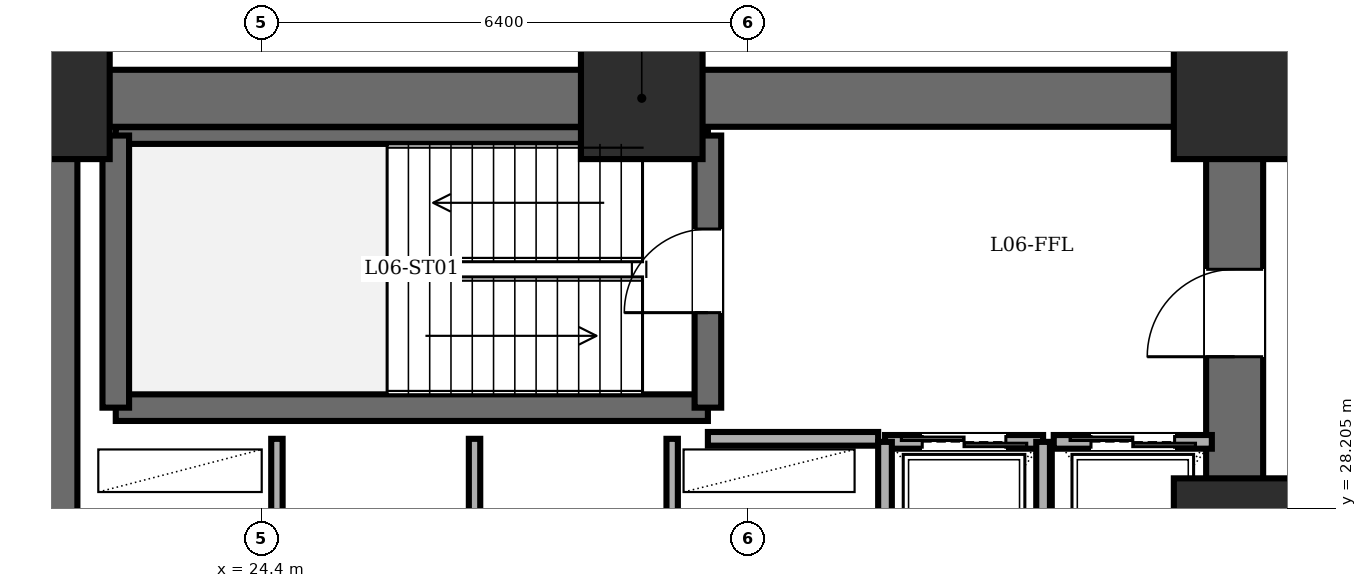
"""IFC4 building model, lengths in metres.
Left out: names, types, materials, properties, quantities, classifications, styles, units other than length and angle.
Written with IfcOpenShell. Run it as: python <this file> out.ifc"""

import sys

from ifc_helpers import new_model, si_unit, direction, frame, frame_2d, origin, origin_2d, place, context, subcontext, project, spatial, rectangle, extrude, element, fill, save


model = new_model("IFC4")
c1 = context("Model", 3, precision=1e-05, world=origin(), true_north=direction((0.0, 1.0)))
c2 = subcontext(c1, "Body", "Model", "MODEL_VIEW")
j1 = project(units=[si_unit("LENGTHUNIT", "METRE"), si_unit("PLANEANGLEUNIT", "RADIAN")], contexts=[c1])
p1 = place(None, origin())
s1 = spatial("IfcSite", under=j1, at=p1, CompositionType="ELEMENT")
p2 = place(p1, origin())
s2 = spatial("IfcBuilding", under=s1, at=p2, CompositionType="ELEMENT")
p3 = place(p2, frame((0.0, 0.0, 24.0)))
s3 = spatial("IfcBuildingStorey", under=s2, at=p3, CompositionType="ELEMENT", Elevation=24.0)
for number, where, z_axis, x_axis in (
    (1, (37.2, 27.8, 0.0), (0.0, 0.0, 1.0), (1.0, 0.0, 0.0)),
    (2, (37.2, 33.6, 0.0), (0.0, 0.0, 1.0), (1.0, 0.0, 0.0)),
    (3, (29.4, 33.6, 0.0), (0.0, 0.0, 1.0), (1.0, 0.0, 0.0)),
    (4, (21.6, 33.6, 0.0), (0.0, 0.0, 1.0), (1.0, 0.0, 0.0)),
):
    element("IfcColumn", number, at=place(p3, frame(where, z_axis=z_axis, x_axis=x_axis)), inside=s3, PredefinedType="COLUMN", context=c2, shape_type="SweptSolid", body=[
        extrude(rectangle(XDim=1.6, YDim=1.6, at=origin_2d()), origin(), (0.0, 0.0, 1.0), 4.8),
    ])
p4 = place(p3, frame((21.6, 14.4, 0.0), z_axis=(0.0, 0.0, 1.0), x_axis=(0.0, 1.0, 0.0)))
e5 = element("IfcWall", 5, at=p4, inside=s3, PredefinedType="SHEAR", context=c2, shape_type="SweptSolid", body=[
    extrude(rectangle(XDim=19.2, YDim=0.75, at=frame_2d((9.6, 0.0))), origin(), (0.0, 0.0, 1.0), 4.6),
])
p5 = place(p3, frame((21.6, 33.6, 0.0), z_axis=(0.0, 0.0, 1.0), x_axis=(1.0, 0.0, 0.0)))
e6 = element("IfcWall", 6, at=p5, inside=s3, PredefinedType="SHEAR", context=c2, shape_type="SweptSolid", body=[
    extrude(rectangle(XDim=15.6, YDim=0.75, at=frame_2d((7.8, 0.0))), origin(), (0.0, 0.0, 1.0), 4.6),
])
p6 = place(p3, frame((37.2, 14.4, 0.0), z_axis=(0.0, 0.0, 1.0), x_axis=(0.0, 1.0, 0.0)))
e7 = element("IfcWall", 7, at=p6, inside=s3, PredefinedType="SHEAR", context=c2, shape_type="SweptSolid", body=[
    extrude(rectangle(XDim=19.2, YDim=0.75, at=frame_2d((9.6, 0.0))), origin(), (0.0, 0.0, 1.0), 4.6),
])
p7 = place(p6, frame((15.8, 0.0, 0.0)))
e8 = element("IfcOpeningElement", 8, at=p7, cuts=e7, PredefinedType="OPENING", context=c2, shape_type="SweptSolid", body=[
    extrude(rectangle(XDim=1.15, YDim=2.15, at=frame_2d((0.575, 1.075))), frame((0.0, 0.385, 0.0), z_axis=(0.0, -1.0, 0.0), x_axis=(1.0, 0.0, 0.0)), (0.0, 0.0, 1.0), 0.77),
])
p8 = place(p6, frame((3.6, 0.0, 0.0)))
e9 = element("IfcOpeningElement", 9, at=p8, cuts=e7, PredefinedType="OPENING", context=c2, shape_type="SweptSolid", body=[
    extrude(rectangle(XDim=1.1, YDim=2.15, at=frame_2d((0.55, 1.075))), frame((0.0, 0.385, 0.0), z_axis=(0.0, -1.0, 0.0), x_axis=(1.0, 0.0, 0.0)), (0.0, 0.0, 1.0), 0.77),
])
p9 = place(p6, frame((8.6, 0.0, 0.0)))
e10 = element("IfcOpeningElement", 10, at=p9, cuts=e7, PredefinedType="OPENING", context=c2, shape_type="SweptSolid", body=[
    extrude(rectangle(XDim=1.3, YDim=2.2, at=frame_2d((0.65, 1.1))), frame((0.0, 0.385, 0.0), z_axis=(0.0, -1.0, 0.0), x_axis=(1.0, 0.0, 0.0)), (0.0, 0.0, 1.0), 0.77),
])
p10 = place(p3, frame((22.48, 29.53, 0.0), z_axis=(0.0, 0.0, 1.0), x_axis=(1.0, 0.0, 0.0)))
e11 = element("IfcWall", 11, at=p10, inside=s3, PredefinedType="SOLIDWALL", context=c2, shape_type="SweptSolid", body=[
    extrude(rectangle(XDim=7.79, YDim=0.35, at=frame_2d((3.895, 0.0))), origin(), (0.0, 0.0, 1.0), 4.6),
])
p11 = place(p3, frame((22.48, 33.11, 0.0), z_axis=(0.0, 0.0, 1.0), x_axis=(1.0, 0.0, 0.0)))
e12 = element("IfcWall", 12, at=p11, inside=s3, PredefinedType="PARTITIONING", context=c2, shape_type="SweptSolid", body=[
    extrude(rectangle(XDim=7.79, YDim=0.22, at=frame_2d((3.895, 0.0))), origin(), (0.0, 0.0, 1.0), 4.6),
])
p12 = place(p3, frame((22.48, 29.53, 0.0), z_axis=(0.0, 0.0, 1.0), x_axis=(0.0, 1.0, 0.0)))
e13 = element("IfcWall", 13, at=p12, inside=s3, PredefinedType="SOLIDWALL", context=c2, shape_type="SweptSolid", body=[
    extrude(rectangle(XDim=3.58, YDim=0.35, at=frame_2d((1.79, 0.0))), origin(), (0.0, 0.0, 1.0), 4.6),
])
p13 = place(p3, frame((30.27, 29.53, 0.0), z_axis=(0.0, 0.0, 1.0), x_axis=(0.0, 1.0, 0.0)))
e14 = element("IfcWall", 14, at=p13, inside=s3, PredefinedType="SOLIDWALL", context=c2, shape_type="SweptSolid", body=[
    extrude(rectangle(XDim=3.58, YDim=0.35, at=frame_2d((1.79, 0.0))), origin(), (0.0, 0.0, 1.0), 4.6),
])
p14 = place(p13, frame((1.25, 0.0, 0.0)))
e15 = element("IfcOpeningElement", 15, at=p14, cuts=e14, PredefinedType="OPENING", context=c2, shape_type="SweptSolid", body=[
    extrude(rectangle(XDim=1.1, YDim=2.15, at=frame_2d((0.55, 1.075))), frame((0.0, 0.185, 0.0), z_axis=(0.0, -1.0, 0.0), x_axis=(1.0, 0.0, 0.0)), (0.0, 0.0, 1.0), 0.37),
])
p15 = place(p3, frame((30.27, 29.12, 0.0), z_axis=(0.0, 0.0, 1.0), x_axis=(1.0, 0.0, 0.0)))
e16 = element("IfcWall", 16, at=p15, inside=s3, PredefinedType="PARTITIONING", context=c2, shape_type="SweptSolid", body=[
    extrude(rectangle(XDim=2.24, YDim=0.18, at=frame_2d((1.12, 0.0))), origin(), (0.0, 0.0, 1.0), 4.6),
])
for number, where, z_axis, x_axis in (
    (17, (24.6, 27.6, 0.0), (0.0, 0.0, 1.0), (0.0, 1.0, 0.0)),
    (18, (27.2, 27.6, 0.0), (0.0, 0.0, 1.0), (0.0, 1.0, 0.0)),
    (19, (29.8, 27.6, 0.0), (0.0, 0.0, 1.0), (0.0, 1.0, 0.0)),
):
    element("IfcWall", number, at=place(p3, frame(where, z_axis=z_axis, x_axis=x_axis)), inside=s3, PredefinedType="PARTITIONING", context=c2, shape_type="SweptSolid", body=[
        extrude(rectangle(XDim=1.52, YDim=0.15, at=frame_2d((0.76, 0.0))), origin(), (0.0, 0.0, 1.0), 4.6),
    ])
p16 = place(p3, frame((32.6, 29.08, 0.0), z_axis=(0.0, 0.0, 1.0), x_axis=(1.0, 0.0, 0.0)))
e20 = element("IfcWall", 20, at=p16, inside=s3, PredefinedType="PARTITIONING", context=c2, shape_type="SweptSolid", body=[
    extrude(rectangle(XDim=2.08, YDim=0.18, at=frame_2d((1.04, 0.0))), origin(), (0.0, 0.0, 1.0), 4.6),
])
p17 = place(p16, frame((0.49, 0.0, 0.0)))
e21 = element("IfcOpeningElement", 21, at=p17, cuts=e20, PredefinedType="OPENING", context=c2, shape_type="SweptSolid", body=[
    extrude(rectangle(XDim=1.1, YDim=2.2, at=frame_2d((0.55, 1.1))), frame((0.0, 0.1, 0.0), z_axis=(0.0, -1.0, 0.0), x_axis=(1.0, 0.0, 0.0)), (0.0, 0.0, 1.0), 0.2),
])
for number, where, z_axis, x_axis in (
    (22, (34.68, 26.35, 0.0), (0.0, 0.0, 1.0), (0.0, 1.0, 0.0)),
    (23, (32.6, 29.08, 0.0), (0.0, 0.0, 1.0), (0.0, -1.0, 0.0)),
):
    element("IfcWall", number, at=place(p3, frame(where, z_axis=z_axis, x_axis=x_axis)), inside=s3, PredefinedType="PARTITIONING", context=c2, shape_type="SweptSolid", body=[
        extrude(rectangle(XDim=2.73, YDim=0.18, at=frame_2d((1.365, 0.0))), origin(), (0.0, 0.0, 1.0), 4.6),
    ])
p18 = place(p3, frame((34.82, 29.08, 0.0), z_axis=(0.0, 0.0, 1.0), x_axis=(1.0, 0.0, 0.0)))
e24 = element("IfcWall", 24, at=p18, inside=s3, PredefinedType="PARTITIONING", context=c2, shape_type="SweptSolid", body=[
    extrude(rectangle(XDim=2.08, YDim=0.18, at=frame_2d((1.04, 0.0))), origin(), (0.0, 0.0, 1.0), 4.6),
])
p19 = place(p18, frame((0.49, 0.0, 0.0)))
e25 = element("IfcOpeningElement", 25, at=p19, cuts=e24, PredefinedType="OPENING", context=c2, shape_type="SweptSolid", body=[
    extrude(rectangle(XDim=1.1, YDim=2.2, at=frame_2d((0.55, 1.1))), frame((0.0, 0.1, 0.0), z_axis=(0.0, -1.0, 0.0), x_axis=(1.0, 0.0, 0.0)), (0.0, 0.0, 1.0), 0.2),
])
p20 = place(p14, origin())
e26 = element("IfcDoor", 26, at=p20, inside=s3, OperationType="SINGLE_SWING_LEFT", PredefinedType="DOOR", context=c2, shape_type="SweptSolid", body=[
    extrude(rectangle(XDim=1.1, YDim=2.15, at=frame_2d((0.55, 1.075))), frame((0.0, 0.025, 0.0), z_axis=(0.0, -1.0, 0.0), x_axis=(1.0, 0.0, 0.0)), (0.0, 0.0, 1.0), 0.05),
])
fill(e15, e26)
p21 = place(p7, origin())
e27 = element("IfcDoor", 27, at=p21, inside=s3, OperationType="SINGLE_SWING_LEFT", PredefinedType="DOOR", context=c2, shape_type="SweptSolid", body=[
    extrude(rectangle(XDim=1.15, YDim=2.15, at=frame_2d((0.575, 1.075))), frame((0.0, 0.025, 0.0), z_axis=(0.0, -1.0, 0.0), x_axis=(1.0, 0.0, 0.0)), (0.0, 0.0, 1.0), 0.05),
])
fill(e8, e27)
p22 = place(p17, origin())
e28 = element("IfcDoor", 28, at=p22, inside=s3, OperationType="DOUBLE_DOOR_SLIDING", PredefinedType="DOOR", context=c2, shape_type="SweptSolid", body=[
    extrude(rectangle(XDim=1.1, YDim=2.2, at=frame_2d((0.55, 1.1))), frame((0.0, 0.025, 0.0), z_axis=(0.0, -1.0, 0.0), x_axis=(1.0, 0.0, 0.0)), (0.0, 0.0, 1.0), 0.05),
])
fill(e21, e28)
p23 = place(p19, origin())
e29 = element("IfcDoor", 29, at=p23, inside=s3, OperationType="DOUBLE_DOOR_SLIDING", PredefinedType="DOOR", context=c2, shape_type="SweptSolid", body=[
    extrude(rectangle(XDim=1.1, YDim=2.2, at=frame_2d((0.55, 1.1))), frame((0.0, 0.025, 0.0), z_axis=(0.0, -1.0, 0.0), x_axis=(1.0, 0.0, 0.0)), (0.0, 0.0, 1.0), 0.05),
])
fill(e25, e29)
save(model, sys.argv[1])
